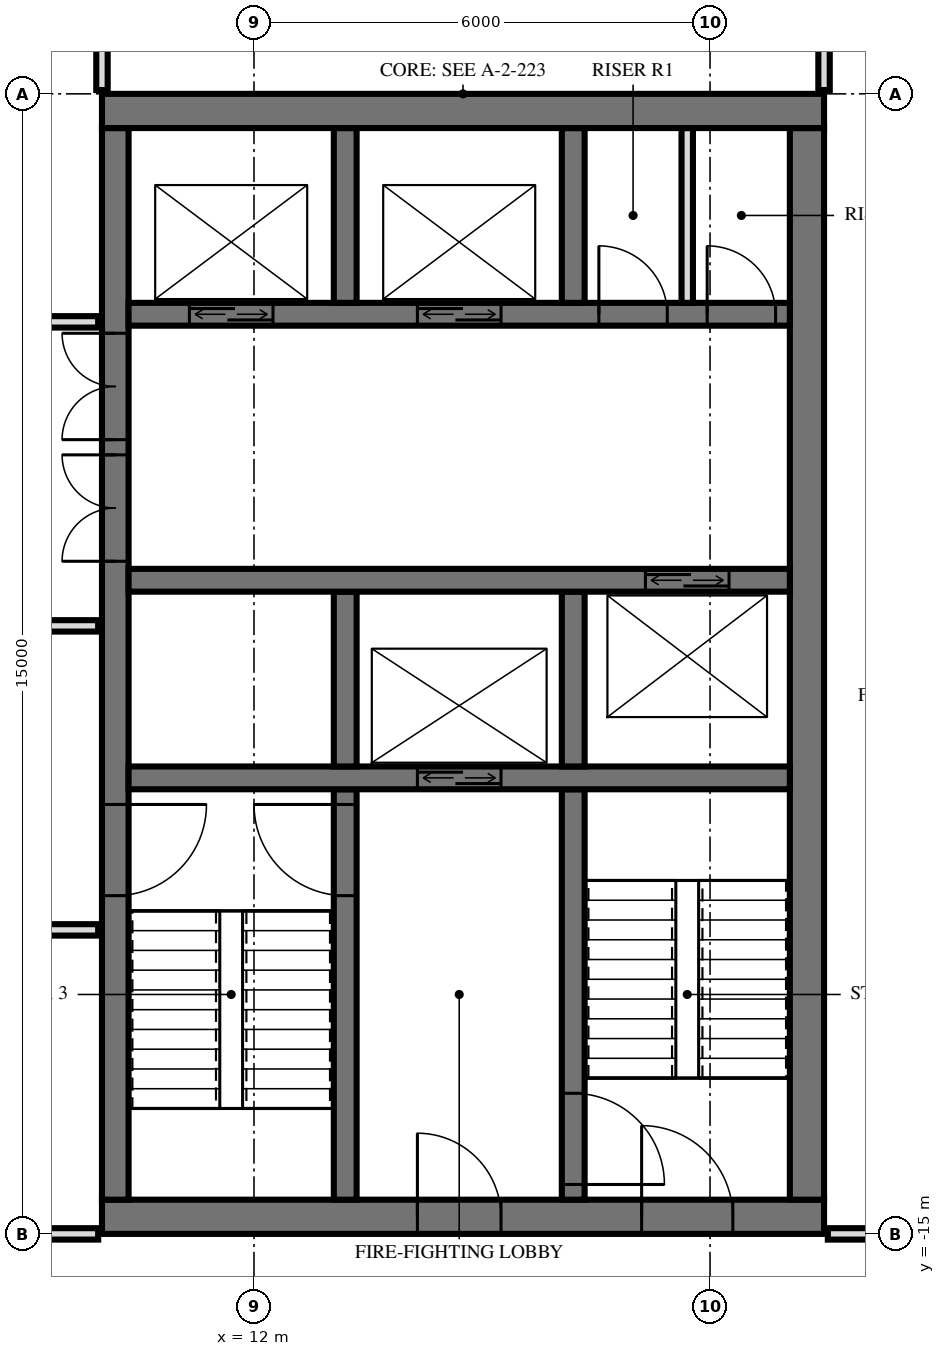
"""IFC4 building model, lengths in metres.
Left out: names, types, materials, properties, quantities, classifications, styles, units other than length and angle.
Written with IfcOpenShell. Run it as: python <this file> out.ifc"""

import sys

from ifc_helpers import new_model, si_unit, direction, frame, frame_2d, origin, place, context, subcontext, project, spatial, rectangle, extrude, element, fill, save


model = new_model("IFC4")
c1 = context("Model", 3, precision=1e-05, world=origin(), true_north=direction((0.0, 1.0)))
c2 = subcontext(c1, "Body", "Model", "MODEL_VIEW")
j1 = project(units=[si_unit("LENGTHUNIT", "METRE"), si_unit("PLANEANGLEUNIT", "RADIAN")], contexts=[c1])
p1 = place(None, origin())
s1 = spatial("IfcSite", under=j1, at=p1, CompositionType="ELEMENT")
p2 = place(p1, origin())
s2 = spatial("IfcBuilding", under=s1, at=p2, CompositionType="ELEMENT")
p3 = place(p2, frame((0.0, 0.0, 334.6)))
s3 = spatial("IfcBuildingStorey", under=s2, at=p3, CompositionType="ELEMENT", Elevation=334.6)
p4 = place(p3, frame((10.0, -0.225, 0.0), z_axis=(0.0, 0.0, 1.0), x_axis=(1.0, 0.0, 0.0)))
e1 = element("IfcWall", 1, at=p4, inside=s3, PredefinedType="SHEAR", context=c2, shape_type="SweptSolid", body=[
    extrude(rectangle(XDim=9.5, YDim=0.45, at=frame_2d((4.75, 0.0))), origin(), (0.0, 0.0, 1.0), 4.0),
])
p5 = place(p3, frame((10.0, -14.775, 0.0), z_axis=(0.0, 0.0, 1.0), x_axis=(1.0, 0.0, 0.0)))
e2 = element("IfcWall", 2, at=p5, inside=s3, PredefinedType="SHEAR", context=c2, shape_type="SweptSolid", body=[
    extrude(rectangle(XDim=9.5, YDim=0.45, at=frame_2d((4.75, 0.0))), origin(), (0.0, 0.0, 1.0), 4.0),
])
p6 = place(p5, frame((7.1, 0.0, 0.0)))
e3 = element("IfcOpeningElement", 3, at=p6, cuts=e2, PredefinedType="OPENING", context=c2, shape_type="SweptSolid", body=[
    extrude(rectangle(XDim=1.2, YDim=2.1, at=frame_2d((0.6, 1.05))), frame((0.0, 0.235, 0.0), z_axis=(0.0, -1.0, 0.0), x_axis=(1.0, 0.0, 0.0)), (0.0, 0.0, 1.0), 0.47),
])
p7 = place(p5, frame((4.15, 0.0, 0.0)))
e4 = element("IfcOpeningElement", 4, at=p7, cuts=e2, PredefinedType="OPENING", context=c2, shape_type="SweptSolid", body=[
    extrude(rectangle(XDim=1.1, YDim=2.1, at=frame_2d((0.55, 1.05))), frame((0.0, 0.235, 0.0), z_axis=(0.0, -1.0, 0.0), x_axis=(1.0, 0.0, 0.0)), (0.0, 0.0, 1.0), 0.47),
])
p8 = place(p3, frame((10.175, -14.55, 0.0), z_axis=(0.0, 0.0, 1.0), x_axis=(0.0, 1.0, 0.0)))
e5 = element("IfcWall", 5, at=p8, inside=s3, PredefinedType="SHEAR", context=c2, shape_type="SweptSolid", body=[
    extrude(rectangle(XDim=14.1, YDim=0.35, at=frame_2d((7.05, 0.0))), origin(), (0.0, 0.0, 1.0), 4.0),
])
p9 = place(p8, frame((8.4, 0.0, 0.0)))
e6 = element("IfcOpeningElement", 6, at=p9, cuts=e5, PredefinedType="OPENING", context=c2, shape_type="SweptSolid", body=[
    extrude(rectangle(XDim=1.4, YDim=2.4, at=frame_2d((0.7, 1.2))), frame((0.0, 0.185, 0.0), z_axis=(0.0, -1.0, 0.0), x_axis=(1.0, 0.0, 0.0)), (0.0, 0.0, 1.0), 0.37),
])
p10 = place(p8, frame((10.0, 0.0, 0.0)))
e7 = element("IfcOpeningElement", 7, at=p10, cuts=e5, PredefinedType="OPENING", context=c2, shape_type="SweptSolid", body=[
    extrude(rectangle(XDim=1.4, YDim=2.4, at=frame_2d((0.7, 1.2))), frame((0.0, 0.185, 0.0), z_axis=(0.0, -1.0, 0.0), x_axis=(1.0, 0.0, 0.0)), (0.0, 0.0, 1.0), 0.37),
])
p11 = place(p8, frame((4.0, 0.0, 0.0)))
e8 = element("IfcOpeningElement", 8, at=p11, cuts=e5, PredefinedType="OPENING", context=c2, shape_type="SweptSolid", body=[
    extrude(rectangle(XDim=1.2, YDim=2.1, at=frame_2d((0.6, 1.05))), frame((0.0, 0.185, 0.0), z_axis=(0.0, -1.0, 0.0), x_axis=(1.0, 0.0, 0.0)), (0.0, 0.0, 1.0), 0.37),
])
p12 = place(p3, frame((19.275, -14.55, 0.0), z_axis=(0.0, 0.0, 1.0), x_axis=(0.0, 1.0, 0.0)))
e9 = element("IfcWall", 9, at=p12, inside=s3, PredefinedType="SHEAR", context=c2, shape_type="SweptSolid", body=[
    extrude(rectangle(XDim=14.1, YDim=0.45, at=frame_2d((7.05, 0.0))), origin(), (0.0, 0.0, 1.0), 4.0),
])
p13 = place(p3, frame((10.35, -2.9, 0.0), z_axis=(0.0, 0.0, 1.0), x_axis=(1.0, 0.0, 0.0)))
e10 = element("IfcWall", 10, at=p13, inside=s3, PredefinedType="SHEAR", context=c2, shape_type="SweptSolid", body=[
    extrude(rectangle(XDim=8.7, YDim=0.3, at=frame_2d((4.35, 0.0))), origin(), (0.0, 0.0, 1.0), 4.0),
])
p14 = place(p13, frame((0.8, 0.0, 0.0)))
e11 = element("IfcOpeningElement", 11, at=p14, cuts=e10, PredefinedType="OPENING", context=c2, shape_type="SweptSolid", body=[
    extrude(rectangle(XDim=1.1, YDim=2.1, at=frame_2d((0.55, 1.05))), frame((0.0, 0.16, 0.0), z_axis=(0.0, -1.0, 0.0), x_axis=(1.0, 0.0, 0.0)), (0.0, 0.0, 1.0), 0.32),
])
p15 = place(p13, frame((3.8, 0.0, 0.0)))
e12 = element("IfcOpeningElement", 12, at=p15, cuts=e10, PredefinedType="OPENING", context=c2, shape_type="SweptSolid", body=[
    extrude(rectangle(XDim=1.1, YDim=2.1, at=frame_2d((0.55, 1.05))), frame((0.0, 0.16, 0.0), z_axis=(0.0, -1.0, 0.0), x_axis=(1.0, 0.0, 0.0)), (0.0, 0.0, 1.0), 0.32),
])
p16 = place(p13, frame((6.188, 0.0, 0.0)))
e13 = element("IfcOpeningElement", 13, at=p16, cuts=e10, PredefinedType="OPENING", context=c2, shape_type="SweptSolid", body=[
    extrude(rectangle(XDim=0.9, YDim=2.1, at=frame_2d((0.45, 1.05))), frame((0.0, 0.16, 0.0), z_axis=(0.0, -1.0, 0.0), x_axis=(1.0, 0.0, 0.0)), (0.0, 0.0, 1.0), 0.32),
])
p17 = place(p13, frame((7.613, 0.0, 0.0)))
e14 = element("IfcOpeningElement", 14, at=p17, cuts=e10, PredefinedType="OPENING", context=c2, shape_type="SweptSolid", body=[
    extrude(rectangle(XDim=0.9, YDim=2.1, at=frame_2d((0.45, 1.05))), frame((0.0, 0.16, 0.0), z_axis=(0.0, -1.0, 0.0), x_axis=(1.0, 0.0, 0.0)), (0.0, 0.0, 1.0), 0.32),
])
p18 = place(p3, frame((10.35, -6.4, 0.0), z_axis=(0.0, 0.0, 1.0), x_axis=(1.0, 0.0, 0.0)))
e15 = element("IfcWall", 15, at=p18, inside=s3, PredefinedType="SHEAR", context=c2, shape_type="SweptSolid", body=[
    extrude(rectangle(XDim=8.7, YDim=0.3, at=frame_2d((4.35, 0.0))), origin(), (0.0, 0.0, 1.0), 4.0),
])
p19 = place(p18, frame((6.8, 0.0, 0.0)))
e16 = element("IfcOpeningElement", 16, at=p19, cuts=e15, PredefinedType="OPENING", context=c2, shape_type="SweptSolid", body=[
    extrude(rectangle(XDim=1.1, YDim=2.1, at=frame_2d((0.55, 1.05))), frame((0.0, 0.16, 0.0), z_axis=(0.0, -1.0, 0.0), x_axis=(1.0, 0.0, 0.0)), (0.0, 0.0, 1.0), 0.32),
])
p20 = place(p3, frame((10.35, -9.0, 0.0), z_axis=(0.0, 0.0, 1.0), x_axis=(1.0, 0.0, 0.0)))
e17 = element("IfcWall", 17, at=p20, inside=s3, PredefinedType="SHEAR", context=c2, shape_type="SweptSolid", body=[
    extrude(rectangle(XDim=8.7, YDim=0.3, at=frame_2d((4.35, 0.0))), origin(), (0.0, 0.0, 1.0), 4.0),
])
p21 = place(p20, frame((3.8, 0.0, 0.0)))
e18 = element("IfcOpeningElement", 18, at=p21, cuts=e17, PredefinedType="OPENING", context=c2, shape_type="SweptSolid", body=[
    extrude(rectangle(XDim=1.1, YDim=2.1, at=frame_2d((0.55, 1.05))), frame((0.0, 0.16, 0.0), z_axis=(0.0, -1.0, 0.0), x_axis=(1.0, 0.0, 0.0)), (0.0, 0.0, 1.0), 0.32),
])
for number, where, z_axis, x_axis in (
    (19, (13.2, -2.75, 0.0), (0.0, 0.0, 1.0), (0.0, 1.0, 0.0)),
    (20, (13.2, -8.85, 0.0), (0.0, 0.0, 1.0), (0.0, 1.0, 0.0)),
):
    element("IfcWall", number, at=place(p3, frame(where, z_axis=z_axis, x_axis=x_axis)), inside=s3, PredefinedType="SHEAR", context=c2, shape_type="SweptSolid", body=[
        extrude(rectangle(XDim=2.3, YDim=0.3, at=frame_2d((1.15, 0.0))), origin(), (0.0, 0.0, 1.0), 4.0),
    ])
p22 = place(p3, frame((13.2, -14.55, 0.0), z_axis=(0.0, 0.0, 1.0), x_axis=(0.0, 1.0, 0.0)))
e21 = element("IfcWall", 21, at=p22, inside=s3, PredefinedType="SHEAR", context=c2, shape_type="SweptSolid", body=[
    extrude(rectangle(XDim=5.4, YDim=0.3, at=frame_2d((2.7, 0.0))), origin(), (0.0, 0.0, 1.0), 4.0),
])
p23 = place(p22, frame((4.0, 0.0, 0.0)))
e22 = element("IfcOpeningElement", 22, at=p23, cuts=e21, PredefinedType="OPENING", context=c2, shape_type="SweptSolid", body=[
    extrude(rectangle(XDim=1.2, YDim=2.1, at=frame_2d((0.6, 1.05))), frame((0.0, 0.16, 0.0), z_axis=(0.0, -1.0, 0.0), x_axis=(1.0, 0.0, 0.0)), (0.0, 0.0, 1.0), 0.32),
])
for number, where, z_axis, x_axis in (
    (23, (16.2, -2.75, 0.0), (0.0, 0.0, 1.0), (0.0, 1.0, 0.0)),
    (24, (16.2, -8.85, 0.0), (0.0, 0.0, 1.0), (0.0, 1.0, 0.0)),
):
    element("IfcWall", number, at=place(p3, frame(where, z_axis=z_axis, x_axis=x_axis)), inside=s3, PredefinedType="SHEAR", context=c2, shape_type="SweptSolid", body=[
        extrude(rectangle(XDim=2.3, YDim=0.3, at=frame_2d((1.15, 0.0))), origin(), (0.0, 0.0, 1.0), 4.0),
    ])
p24 = place(p3, frame((16.2, -14.55, 0.0), z_axis=(0.0, 0.0, 1.0), x_axis=(0.0, 1.0, 0.0)))
e25 = element("IfcWall", 25, at=p24, inside=s3, PredefinedType="SHEAR", context=c2, shape_type="SweptSolid", body=[
    extrude(rectangle(XDim=5.4, YDim=0.3, at=frame_2d((2.7, 0.0))), origin(), (0.0, 0.0, 1.0), 4.0),
])
p25 = place(p24, frame((0.2, 0.0, 0.0)))
e26 = element("IfcOpeningElement", 26, at=p25, cuts=e25, PredefinedType="OPENING", context=c2, shape_type="SweptSolid", body=[
    extrude(rectangle(XDim=1.2, YDim=2.1, at=frame_2d((0.6, 1.05))), frame((0.0, 0.16, 0.0), z_axis=(0.0, -1.0, 0.0), x_axis=(1.0, 0.0, 0.0)), (0.0, 0.0, 1.0), 0.32),
])
p26 = place(p3, frame((17.7, -2.75, 0.0), z_axis=(0.0, 0.0, 1.0), x_axis=(0.0, 1.0, 0.0)))
e27 = element("IfcWall", 27, at=p26, inside=s3, PredefinedType="PARTITIONING", context=c2, shape_type="SweptSolid", body=[
    extrude(rectangle(XDim=2.3, YDim=0.15, at=frame_2d((1.15, 0.0))), origin(), (0.0, 0.0, 1.0), 3.7),
])
p27 = place(p3, frame((19.5, 0.05, 0.0), z_axis=(0.0, 0.0, 1.0), x_axis=(0.0, 1.0, 0.0)))
e28 = element("IfcWall", 28, at=p27, inside=s3, PredefinedType="PARTITIONING", context=c2, shape_type="SweptSolid", body=[
    extrude(rectangle(XDim=4.403, YDim=0.15, at=frame_2d((2.202, 0.0))), origin(), (0.0, 0.0, 1.0), 3.72),
])
p28 = place(p3, frame((10.0, 0.05, 0.0), z_axis=(0.0, 0.0, 1.0), x_axis=(0.0, 1.0, 0.0)))
e29 = element("IfcWall", 29, at=p28, inside=s3, PredefinedType="PARTITIONING", context=c2, shape_type="SweptSolid", body=[
    extrude(rectangle(XDim=4.702, YDim=0.15, at=frame_2d((2.351, 0.0))), origin(), (0.0, 0.0, 1.0), 3.72),
])
p29 = place(p3, frame((-3.506, -15.0, 0.0), z_axis=(0.0, 0.0, 1.0), x_axis=(1.0, 0.0, 0.0)))
e30 = element("IfcWall", 30, at=p29, inside=s3, PredefinedType="PARTITIONING", context=c2, shape_type="SweptSolid", body=[
    extrude(rectangle(XDim=13.456, YDim=0.15, at=frame_2d((6.728, 0.0))), origin(), (0.0, 0.0, 1.0), 3.084),
])
p30 = place(p29, frame((6.253, 0.0, 0.0)))
e31 = element("IfcOpeningElement", 31, at=p30, cuts=e30, PredefinedType="OPENING", context=c2, shape_type="SweptSolid", body=[
    extrude(rectangle(XDim=1.0, YDim=2.1, at=frame_2d((0.5, 1.05))), frame((0.0, 0.085, 0.0), z_axis=(0.0, -1.0, 0.0), x_axis=(1.0, 0.0, 0.0)), (0.0, 0.0, 1.0), 0.17),
])
p31 = place(p3, frame((19.55, -15.0, 0.0), z_axis=(0.0, 0.0, 1.0), x_axis=(1.0, 0.0, 0.0)))
e32 = element("IfcWall", 32, at=p31, inside=s3, PredefinedType="PARTITIONING", context=c2, shape_type="SweptSolid", body=[
    extrude(rectangle(XDim=3.49, YDim=0.15, at=frame_2d((1.745, 0.0))), origin(), (0.0, 0.0, 1.0), 3.72),
])
p32 = place(p31, frame((1.311, 0.0, 0.0)))
e33 = element("IfcOpeningElement", 33, at=p32, cuts=e32, PredefinedType="OPENING", context=c2, shape_type="SweptSolid", body=[
    extrude(rectangle(XDim=1.0, YDim=2.1, at=frame_2d((0.5, 1.05))), frame((0.0, 0.085, 0.0), z_axis=(0.0, -1.0, 0.0), x_axis=(1.0, 0.0, 0.0)), (0.0, 0.0, 1.0), 0.17),
])
p33 = place(p3, frame((-9.95, -11.0, 0.0), z_axis=(0.0, 0.0, 1.0), x_axis=(1.0, 0.0, 0.0)))
e34 = element("IfcWall", 34, at=p33, inside=s3, PredefinedType="PARTITIONING", context=c2, shape_type="SweptSolid", body=[
    extrude(rectangle(XDim=19.9, YDim=0.15, at=frame_2d((9.95, 0.0))), origin(), (0.0, 0.0, 1.0), 3.72),
])
p34 = place(p33, frame((9.45, 0.0, 0.0)))
e35 = element("IfcOpeningElement", 35, at=p34, cuts=e34, PredefinedType="OPENING", context=c2, shape_type="SweptSolid", body=[
    extrude(rectangle(XDim=1.0, YDim=2.1, at=frame_2d((0.5, 1.05))), frame((0.0, 0.085, 0.0), z_axis=(0.0, -1.0, 0.0), x_axis=(1.0, 0.0, 0.0)), (0.0, 0.0, 1.0), 0.17),
])
p35 = place(p33, frame((16.7, 0.0, 0.0)))
e36 = element("IfcOpeningElement", 36, at=p35, cuts=e34, PredefinedType="OPENING", context=c2, shape_type="SweptSolid", body=[
    extrude(rectangle(XDim=1.0, YDim=2.1, at=frame_2d((0.5, 1.05))), frame((0.0, 0.085, 0.0), z_axis=(0.0, -1.0, 0.0), x_axis=(1.0, 0.0, 0.0)), (0.0, 0.0, 1.0), 0.17),
])
p36 = place(p3, frame((-9.95, -7.0, 0.0), z_axis=(0.0, 0.0, 1.0), x_axis=(1.0, 0.0, 0.0)))
e37 = element("IfcWall", 37, at=p36, inside=s3, PredefinedType="PARTITIONING", context=c2, shape_type="SweptSolid", body=[
    extrude(rectangle(XDim=19.9, YDim=0.15, at=frame_2d((9.95, 0.0))), origin(), (0.0, 0.0, 1.0), 3.72),
])
p37 = place(p36, frame((9.45, 0.0, 0.0)))
e38 = element("IfcOpeningElement", 38, at=p37, cuts=e37, PredefinedType="OPENING", context=c2, shape_type="SweptSolid", body=[
    extrude(rectangle(XDim=1.0, YDim=2.1, at=frame_2d((0.5, 1.05))), frame((0.0, 0.085, 0.0), z_axis=(0.0, -1.0, 0.0), x_axis=(1.0, 0.0, 0.0)), (0.0, 0.0, 1.0), 0.17),
])
p38 = place(p36, frame((2.2, 0.0, 0.0)))
e39 = element("IfcOpeningElement", 39, at=p38, cuts=e37, PredefinedType="OPENING", context=c2, shape_type="SweptSolid", body=[
    extrude(rectangle(XDim=1.0, YDim=2.1, at=frame_2d((0.5, 1.05))), frame((0.0, 0.085, 0.0), z_axis=(0.0, -1.0, 0.0), x_axis=(1.0, 0.0, 0.0)), (0.0, 0.0, 1.0), 0.17),
])
p39 = place(p3, frame((-9.95, -3.0, 0.0), z_axis=(0.0, 0.0, 1.0), x_axis=(1.0, 0.0, 0.0)))
e40 = element("IfcWall", 40, at=p39, inside=s3, PredefinedType="PARTITIONING", context=c2, shape_type="SweptSolid", body=[
    extrude(rectangle(XDim=19.9, YDim=0.15, at=frame_2d((9.95, 0.0))), origin(), (0.0, 0.0, 1.0), 3.72),
])
p40 = place(p39, frame((0.95, 0.0, 0.0)))
e41 = element("IfcOpeningElement", 41, at=p40, cuts=e40, PredefinedType="OPENING", context=c2, shape_type="SweptSolid", body=[
    extrude(rectangle(XDim=1.0, YDim=2.1, at=frame_2d((0.5, 1.05))), frame((0.0, 0.085, 0.0), z_axis=(0.0, -1.0, 0.0), x_axis=(1.0, 0.0, 0.0)), (0.0, 0.0, 1.0), 0.17),
])
p41 = place(p39, frame((3.7, 0.0, 0.0)))
e42 = element("IfcOpeningElement", 42, at=p41, cuts=e40, PredefinedType="OPENING", context=c2, shape_type="SweptSolid", body=[
    extrude(rectangle(XDim=1.0, YDim=2.1, at=frame_2d((0.5, 1.05))), frame((0.0, 0.085, 0.0), z_axis=(0.0, -1.0, 0.0), x_axis=(1.0, 0.0, 0.0)), (0.0, 0.0, 1.0), 0.17),
])
p42 = place(p39, frame((8.7, 0.0, 0.0)))
e43 = element("IfcOpeningElement", 43, at=p42, cuts=e40, PredefinedType="OPENING", context=c2, shape_type="SweptSolid", body=[
    extrude(rectangle(XDim=1.0, YDim=2.1, at=frame_2d((0.5, 1.05))), frame((0.0, 0.085, 0.0), z_axis=(0.0, -1.0, 0.0), x_axis=(1.0, 0.0, 0.0)), (0.0, 0.0, 1.0), 0.17),
])
p43 = place(p39, frame((15.95, 0.0, 0.0)))
e44 = element("IfcOpeningElement", 44, at=p43, cuts=e40, PredefinedType="OPENING", context=c2, shape_type="SweptSolid", body=[
    extrude(rectangle(XDim=1.0, YDim=2.1, at=frame_2d((0.5, 1.05))), frame((0.0, 0.085, 0.0), z_axis=(0.0, -1.0, 0.0), x_axis=(1.0, 0.0, 0.0)), (0.0, 0.0, 1.0), 0.17),
])
p44 = place(p14, origin())
e45 = element("IfcDoor", 45, at=p44, inside=s3, OperationType="DOUBLE_DOOR_SLIDING", PredefinedType="USERDEFINED", context=c2, shape_type="SweptSolid", body=[
    extrude(rectangle(XDim=1.1, YDim=2.1, at=frame_2d((0.55, 1.05))), frame((0.0, 0.025, 0.0), z_axis=(0.0, -1.0, 0.0), x_axis=(1.0, 0.0, 0.0)), (0.0, 0.0, 1.0), 0.05),
])
fill(e11, e45)
p45 = place(p15, origin())
e46 = element("IfcDoor", 46, at=p45, inside=s3, OperationType="DOUBLE_DOOR_SLIDING", PredefinedType="USERDEFINED", context=c2, shape_type="SweptSolid", body=[
    extrude(rectangle(XDim=1.1, YDim=2.1, at=frame_2d((0.55, 1.05))), frame((0.0, 0.025, 0.0), z_axis=(0.0, -1.0, 0.0), x_axis=(1.0, 0.0, 0.0)), (0.0, 0.0, 1.0), 0.05),
])
fill(e12, e46)
p46 = place(p21, origin())
e47 = element("IfcDoor", 47, at=p46, inside=s3, OperationType="DOUBLE_DOOR_SLIDING", PredefinedType="USERDEFINED", context=c2, shape_type="SweptSolid", body=[
    extrude(rectangle(XDim=1.1, YDim=2.1, at=frame_2d((0.55, 1.05))), frame((0.0, 0.025, 0.0), z_axis=(0.0, -1.0, 0.0), x_axis=(1.0, 0.0, 0.0)), (0.0, 0.0, 1.0), 0.05),
])
fill(e18, e47)
p47 = place(p19, origin())
e48 = element("IfcDoor", 48, at=p47, inside=s3, OperationType="DOUBLE_DOOR_SLIDING", PredefinedType="USERDEFINED", context=c2, shape_type="SweptSolid", body=[
    extrude(rectangle(XDim=1.1, YDim=2.1, at=frame_2d((0.55, 1.05))), frame((0.0, 0.025, 0.0), z_axis=(0.0, -1.0, 0.0), x_axis=(1.0, 0.0, 0.0)), (0.0, 0.0, 1.0), 0.05),
])
fill(e16, e48)
p48 = place(p9, origin())
e49 = element("IfcDoor", 49, at=p48, inside=s3, OperationType="DOUBLE_DOOR_SINGLE_SWING", PredefinedType="DOOR", context=c2, shape_type="SweptSolid", body=[
    extrude(rectangle(XDim=1.4, YDim=2.4, at=frame_2d((0.7, 1.2))), frame((0.0, 0.025, 0.0), z_axis=(0.0, -1.0, 0.0), x_axis=(1.0, 0.0, 0.0)), (0.0, 0.0, 1.0), 0.05),
])
fill(e6, e49)
p49 = place(p10, origin())
e50 = element("IfcDoor", 50, at=p49, inside=s3, OperationType="DOUBLE_DOOR_SINGLE_SWING", PredefinedType="DOOR", context=c2, shape_type="SweptSolid", body=[
    extrude(rectangle(XDim=1.4, YDim=2.4, at=frame_2d((0.7, 1.2))), frame((0.0, 0.025, 0.0), z_axis=(0.0, -1.0, 0.0), x_axis=(1.0, 0.0, 0.0)), (0.0, 0.0, 1.0), 0.05),
])
fill(e7, e50)
p50 = place(p11, frame((0.6, 0.0, 0.0), z_axis=(0.0, 0.0, 1.0), x_axis=(-1.0, 0.0, 0.0)))
e51 = element("IfcDoor", 51, at=p50, inside=s3, OperationType="SINGLE_SWING_RIGHT", PredefinedType="DOOR", context=c2, shape_type="SweptSolid", body=[
    extrude(rectangle(XDim=1.2, YDim=2.1, at=frame_2d((0.0, 1.05))), frame((0.0, -0.025, 0.0), z_axis=(0.0, 1.0, 0.0), x_axis=(-1.0, 0.0, 0.0)), (0.0, 0.0, 1.0), 0.05),
])
fill(e8, e51)
p51 = place(p6, origin())
e52 = element("IfcDoor", 52, at=p51, inside=s3, OperationType="SINGLE_SWING_RIGHT", PredefinedType="DOOR", context=c2, shape_type="SweptSolid", body=[
    extrude(rectangle(XDim=1.2, YDim=2.1, at=frame_2d((0.6, 1.05))), frame((0.0, 0.025, 0.0), z_axis=(0.0, -1.0, 0.0), x_axis=(1.0, 0.0, 0.0)), (0.0, 0.0, 1.0), 0.05),
])
fill(e3, e52)
p52 = place(p7, origin())
e53 = element("IfcDoor", 53, at=p52, inside=s3, OperationType="SINGLE_SWING_RIGHT", PredefinedType="DOOR", context=c2, shape_type="SweptSolid", body=[
    extrude(rectangle(XDim=1.1, YDim=2.1, at=frame_2d((0.55, 1.05))), frame((0.0, 0.025, 0.0), z_axis=(0.0, -1.0, 0.0), x_axis=(1.0, 0.0, 0.0)), (0.0, 0.0, 1.0), 0.05),
])
fill(e4, e53)
p53 = place(p16, origin())
e54 = element("IfcDoor", 54, at=p53, inside=s3, OperationType="SINGLE_SWING_RIGHT", PredefinedType="DOOR", context=c2, shape_type="SweptSolid", body=[
    extrude(rectangle(XDim=0.9, YDim=2.1, at=frame_2d((0.45, 1.05))), frame((0.0, 0.025, 0.0), z_axis=(0.0, -1.0, 0.0), x_axis=(1.0, 0.0, 0.0)), (0.0, 0.0, 1.0), 0.05),
])
fill(e13, e54)
p54 = place(p17, origin())
e55 = element("IfcDoor", 55, at=p54, inside=s3, OperationType="SINGLE_SWING_RIGHT", PredefinedType="DOOR", context=c2, shape_type="SweptSolid", body=[
    extrude(rectangle(XDim=0.9, YDim=2.1, at=frame_2d((0.45, 1.05))), frame((0.0, 0.025, 0.0), z_axis=(0.0, -1.0, 0.0), x_axis=(1.0, 0.0, 0.0)), (0.0, 0.0, 1.0), 0.05),
])
fill(e14, e55)
p55 = place(p23, origin())
e56 = element("IfcDoor", 56, at=p55, inside=s3, OperationType="SINGLE_SWING_LEFT", PredefinedType="DOOR", context=c2, shape_type="SweptSolid", body=[
    extrude(rectangle(XDim=1.2, YDim=2.1, at=frame_2d((0.6, 1.05))), frame((0.0, 0.025, 0.0), z_axis=(0.0, -1.0, 0.0), x_axis=(1.0, 0.0, 0.0)), (0.0, 0.0, 1.0), 0.05),
])
fill(e22, e56)
p56 = place(p25, frame((0.6, 0.0, 0.0), z_axis=(0.0, 0.0, 1.0), x_axis=(-1.0, 0.0, 0.0)))
e57 = element("IfcDoor", 57, at=p56, inside=s3, OperationType="SINGLE_SWING_LEFT", PredefinedType="DOOR", context=c2, shape_type="SweptSolid", body=[
    extrude(rectangle(XDim=1.2, YDim=2.1, at=frame_2d((0.0, 1.05))), frame((0.0, -0.025, 0.0), z_axis=(0.0, 1.0, 0.0), x_axis=(-1.0, 0.0, 0.0)), (0.0, 0.0, 1.0), 0.05),
])
fill(e26, e57)
save(model, sys.argv[1])
